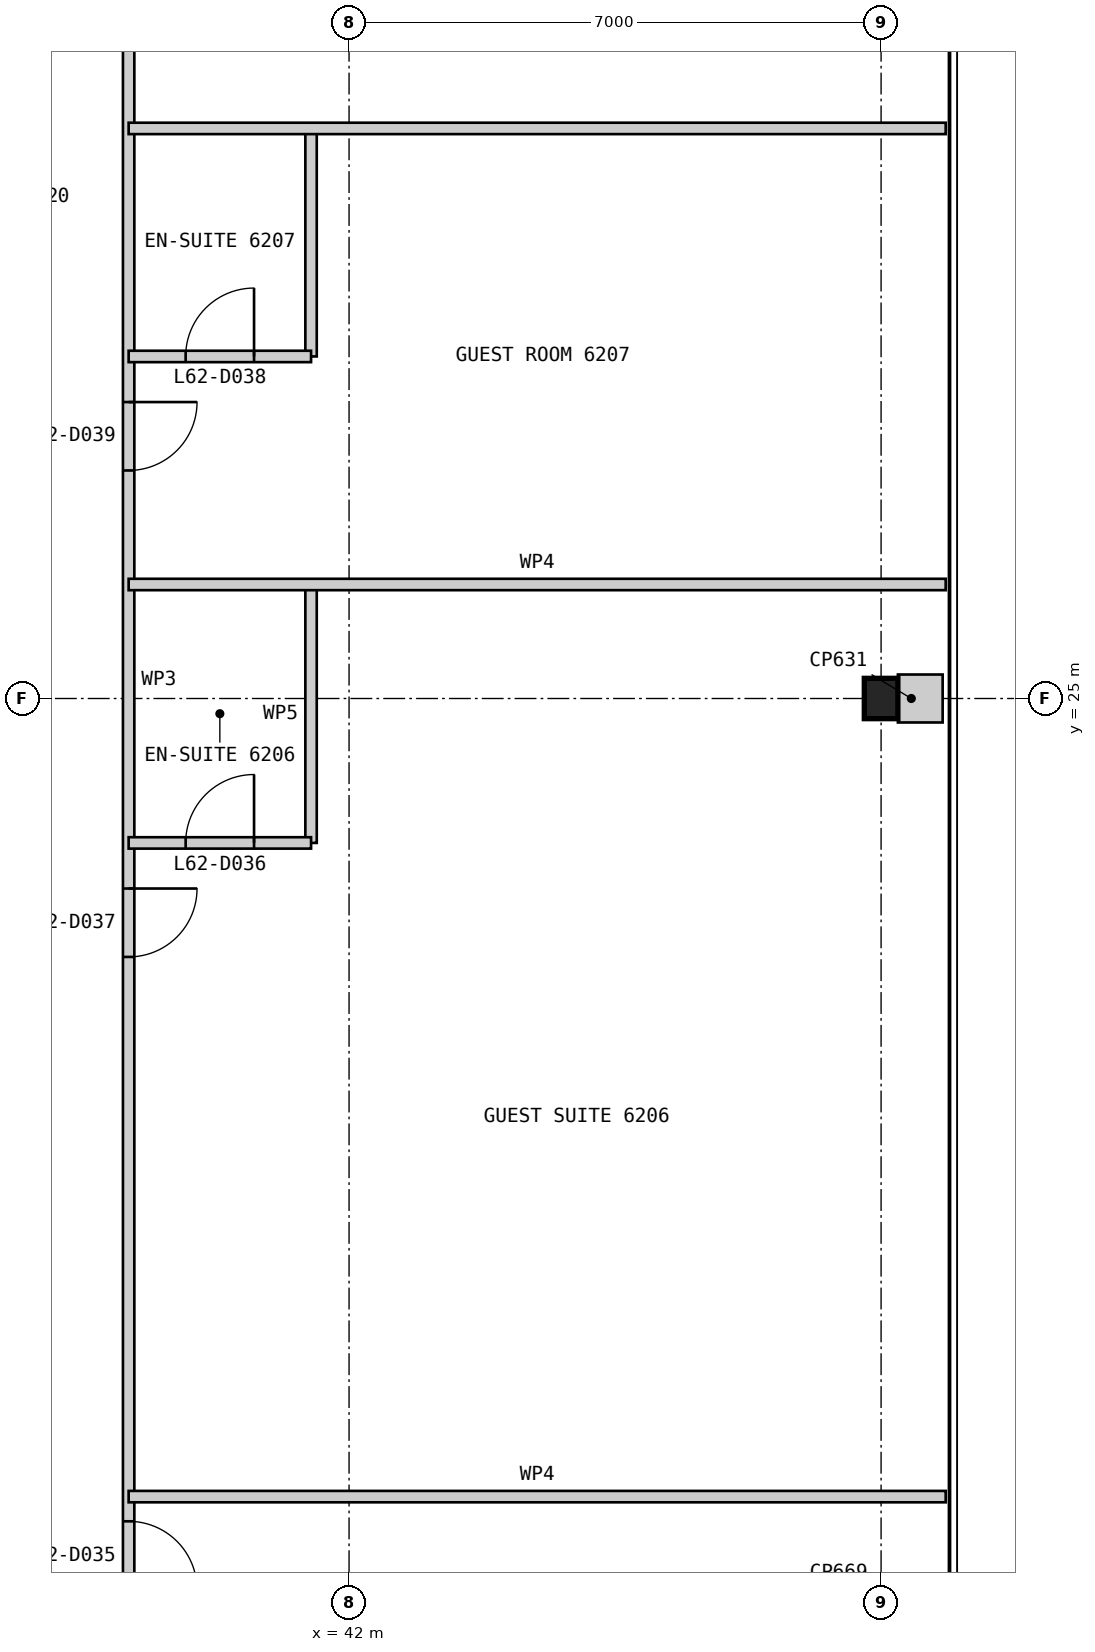
"""IFC4 building model, lengths in metres.
Left out: names, types, materials, properties, quantities, classifications, styles, units other than length and angle.
Written with IfcOpenShell. Run it as: python <this file> out.ifc"""

import sys

from ifc_helpers import new_model, si_unit, direction, frame, frame_2d, origin, origin_2d, place, context, subcontext, project, spatial, rectangle, i_section, extrude, element, fill, save


model = new_model("IFC4")
c1 = context("Model", 3, precision=1e-05, world=origin(), true_north=direction((0.0, 1.0)))
c2 = subcontext(c1, "Body", "Model", "MODEL_VIEW")
j1 = project(units=[si_unit("LENGTHUNIT", "METRE"), si_unit("PLANEANGLEUNIT", "RADIAN")], contexts=[c1])
p1 = place(None, origin())
s1 = spatial("IfcSite", under=j1, at=p1, CompositionType="ELEMENT")
p2 = place(p1, origin())
s2 = spatial("IfcBuilding", under=s1, at=p2, CompositionType="ELEMENT")
p3 = place(p2, frame((0.0, 0.0, 262.8)))
s3 = spatial("IfcBuildingStorey", under=s2, at=p3, CompositionType="ELEMENT", Elevation=262.8)
p4 = place(p3, frame((49.0, 25.0, 0.0), z_axis=(0.0, 0.0, 1.0), x_axis=(1.0, 0.0, 0.0)))
e1 = element("IfcColumn", 1, at=p4, inside=s3, PredefinedType="COLUMN", context=c2, shape_type="SweptSolid", body=[
    extrude(i_section(OverallWidth=0.442, OverallDepth=0.531, WebThickness=0.066, FlangeThickness=0.106, at=origin_2d()), origin(), (0.0, 0.0, 1.0), 3.4),
])
p5 = place(p3, frame((39.1, 10.9, 0.0), z_axis=(0.0, 0.0, 1.0), x_axis=(0.0, 1.0, 0.0)))
e2 = element("IfcWall", 2, at=p5, inside=s3, PredefinedType="PARTITIONING", context=c2, shape_type="SweptSolid", body=[
    extrude(rectangle(XDim=28.2, YDim=0.15, at=frame_2d((14.1, 0.0))), origin(), (0.0, 0.0, 1.0), 3.25),
])
p6 = place(p5, frame((2.375, 0.0, 0.0)))
e3 = element("IfcOpeningElement", 3, at=p6, cuts=e2, PredefinedType="OPENING", context=c2, shape_type="SweptSolid", body=[
    extrude(rectangle(XDim=0.9, YDim=2.1, at=frame_2d((0.45, 1.05))), frame((0.0, 0.085, 0.0), z_axis=(0.0, -1.0, 0.0), x_axis=(1.0, 0.0, 0.0)), (0.0, 0.0, 1.0), 0.17),
])
p7 = place(p5, frame((10.7, 0.0, 0.0)))
e4 = element("IfcOpeningElement", 4, at=p7, cuts=e2, PredefinedType="OPENING", context=c2, shape_type="SweptSolid", body=[
    extrude(rectangle(XDim=0.9, YDim=2.1, at=frame_2d((0.45, 1.05))), frame((0.0, 0.085, 0.0), z_axis=(0.0, -1.0, 0.0), x_axis=(1.0, 0.0, 0.0)), (0.0, 0.0, 1.0), 0.17),
])
p8 = place(p5, frame((17.1, 0.0, 0.0)))
e5 = element("IfcOpeningElement", 5, at=p8, cuts=e2, PredefinedType="OPENING", context=c2, shape_type="SweptSolid", body=[
    extrude(rectangle(XDim=0.9, YDim=2.1, at=frame_2d((0.45, 1.05))), frame((0.0, 0.085, 0.0), z_axis=(0.0, -1.0, 0.0), x_axis=(1.0, 0.0, 0.0)), (0.0, 0.0, 1.0), 0.17),
])
p9 = place(p5, frame((23.7, 0.0, 0.0)))
e6 = element("IfcOpeningElement", 6, at=p9, cuts=e2, PredefinedType="OPENING", context=c2, shape_type="SweptSolid", body=[
    extrude(rectangle(XDim=0.9, YDim=2.1, at=frame_2d((0.45, 1.05))), frame((0.0, 0.085, 0.0), z_axis=(0.0, -1.0, 0.0), x_axis=(1.0, 0.0, 0.0)), (0.0, 0.0, 1.0), 0.17),
])
p10 = place(p3, frame((49.85, 14.5, 0.0), z_axis=(0.0, 0.0, 1.0), x_axis=(-1.0, 0.0, 0.0)))
e7 = element("IfcWall", 7, at=p10, inside=s3, PredefinedType="PARTITIONING", context=c2, shape_type="SweptSolid", body=[
    extrude(rectangle(XDim=10.75, YDim=0.15, at=frame_2d((5.375, 0.0))), origin(), (0.0, 0.0, 1.0), 3.25),
])
p11 = place(p3, frame((41.5, 23.1, 0.0), z_axis=(0.0, 0.0, 1.0), x_axis=(0.0, 1.0, 0.0)))
e8 = element("IfcWall", 8, at=p11, inside=s3, PredefinedType="PARTITIONING", context=c2, shape_type="SweptSolid", body=[
    extrude(rectangle(XDim=3.4, YDim=0.15, at=frame_2d((1.7, 0.0))), origin(), (0.0, 0.0, 1.0), 3.25),
])
p12 = place(p3, frame((41.5, 23.1, 0.0), z_axis=(0.0, 0.0, 1.0), x_axis=(-1.0, 0.0, 0.0)))
e9 = element("IfcWall", 9, at=p12, inside=s3, PredefinedType="PARTITIONING", context=c2, shape_type="SweptSolid", body=[
    extrude(rectangle(XDim=2.4, YDim=0.15, at=frame_2d((1.2, 0.0))), origin(), (0.0, 0.0, 1.0), 3.25),
])
p13 = place(p12, frame((0.75, 0.0, 0.0)))
e10 = element("IfcOpeningElement", 10, at=p13, cuts=e9, PredefinedType="OPENING", context=c2, shape_type="SweptSolid", body=[
    extrude(rectangle(XDim=0.9, YDim=2.1, at=frame_2d((0.45, 1.05))), frame((0.0, 0.085, 0.0), z_axis=(0.0, -1.0, 0.0), x_axis=(1.0, 0.0, 0.0)), (0.0, 0.0, 1.0), 0.17),
])
p14 = place(p3, frame((49.85, 26.5, 0.0), z_axis=(0.0, 0.0, 1.0), x_axis=(-1.0, 0.0, 0.0)))
e11 = element("IfcWall", 11, at=p14, inside=s3, PredefinedType="PARTITIONING", context=c2, shape_type="SweptSolid", body=[
    extrude(rectangle(XDim=10.75, YDim=0.15, at=frame_2d((5.375, 0.0))), origin(), (0.0, 0.0, 1.0), 3.25),
])
p15 = place(p3, frame((41.5, 29.5, 0.0), z_axis=(0.0, 0.0, 1.0), x_axis=(0.0, 1.0, 0.0)))
e12 = element("IfcWall", 12, at=p15, inside=s3, PredefinedType="PARTITIONING", context=c2, shape_type="SweptSolid", body=[
    extrude(rectangle(XDim=3.0, YDim=0.15, at=frame_2d((1.5, 0.0))), origin(), (0.0, 0.0, 1.0), 3.25),
])
p16 = place(p3, frame((41.5, 29.5, 0.0), z_axis=(0.0, 0.0, 1.0), x_axis=(-1.0, 0.0, 0.0)))
e13 = element("IfcWall", 13, at=p16, inside=s3, PredefinedType="PARTITIONING", context=c2, shape_type="SweptSolid", body=[
    extrude(rectangle(XDim=2.4, YDim=0.15, at=frame_2d((1.2, 0.0))), origin(), (0.0, 0.0, 1.0), 3.25),
])
p17 = place(p16, frame((0.75, 0.0, 0.0)))
e14 = element("IfcOpeningElement", 14, at=p17, cuts=e13, PredefinedType="OPENING", context=c2, shape_type="SweptSolid", body=[
    extrude(rectangle(XDim=0.9, YDim=2.1, at=frame_2d((0.45, 1.05))), frame((0.0, 0.085, 0.0), z_axis=(0.0, -1.0, 0.0), x_axis=(1.0, 0.0, 0.0)), (0.0, 0.0, 1.0), 0.17),
])
p18 = place(p3, frame((49.85, 32.5, 0.0), z_axis=(0.0, 0.0, 1.0), x_axis=(-1.0, 0.0, 0.0)))
e15 = element("IfcWall", 15, at=p18, inside=s3, PredefinedType="PARTITIONING", context=c2, shape_type="SweptSolid", body=[
    extrude(rectangle(XDim=10.75, YDim=0.15, at=frame_2d((5.375, 0.0))), origin(), (0.0, 0.0, 1.0), 3.25),
])
p19 = place(p3, frame((49.81, 25.0, 0.0), z_axis=(0.0, 0.0, 1.0), x_axis=(-1.0, 0.0, 0.0)))
e16 = element("IfcWall", 16, at=p19, inside=s3, PredefinedType="PARTITIONING", context=c2, shape_type="SweptSolid", body=[
    extrude(rectangle(XDim=0.589, YDim=0.631, at=frame_2d((0.294, 0.0))), origin(), (0.0, 0.0, 1.0), 3.25),
])
p20 = place(p6, frame((0.9, 0.0, 0.0), z_axis=(0.0, 0.0, 1.0), x_axis=(-1.0, 0.0, 0.0)))
e17 = element("IfcDoor", 17, at=p20, inside=s3, OperationType="SINGLE_SWING_RIGHT", PredefinedType="DOOR", context=c2, shape_type="SweptSolid", body=[
    extrude(rectangle(XDim=0.9, YDim=2.1, at=frame_2d((0.45, 1.05))), frame((0.0, 0.025, 0.0), z_axis=(0.0, -1.0, 0.0), x_axis=(1.0, 0.0, 0.0)), (0.0, 0.0, 1.0), 0.05),
])
fill(e3, e17)
p21 = place(p13, frame((0.9, 0.0, 0.0), z_axis=(0.0, 0.0, 1.0), x_axis=(-1.0, 0.0, 0.0)))
e18 = element("IfcDoor", 18, at=p21, inside=s3, OperationType="SINGLE_SWING_RIGHT", PredefinedType="DOOR", context=c2, shape_type="SweptSolid", body=[
    extrude(rectangle(XDim=0.9, YDim=2.1, at=frame_2d((0.45, 1.05))), frame((0.0, 0.025, 0.0), z_axis=(0.0, -1.0, 0.0), x_axis=(1.0, 0.0, 0.0)), (0.0, 0.0, 1.0), 0.05),
])
fill(e10, e18)
p22 = place(p7, frame((0.9, 0.0, 0.0), z_axis=(0.0, 0.0, 1.0), x_axis=(-1.0, 0.0, 0.0)))
e19 = element("IfcDoor", 19, at=p22, inside=s3, OperationType="SINGLE_SWING_LEFT", PredefinedType="DOOR", context=c2, shape_type="SweptSolid", body=[
    extrude(rectangle(XDim=0.9, YDim=2.1, at=frame_2d((0.45, 1.05))), frame((0.0, 0.025, 0.0), z_axis=(0.0, -1.0, 0.0), x_axis=(1.0, 0.0, 0.0)), (0.0, 0.0, 1.0), 0.05),
])
fill(e4, e19)
p23 = place(p17, frame((0.9, 0.0, 0.0), z_axis=(0.0, 0.0, 1.0), x_axis=(-1.0, 0.0, 0.0)))
e20 = element("IfcDoor", 20, at=p23, inside=s3, OperationType="SINGLE_SWING_RIGHT", PredefinedType="DOOR", context=c2, shape_type="SweptSolid", body=[
    extrude(rectangle(XDim=0.9, YDim=2.1, at=frame_2d((0.45, 1.05))), frame((0.0, 0.025, 0.0), z_axis=(0.0, -1.0, 0.0), x_axis=(1.0, 0.0, 0.0)), (0.0, 0.0, 1.0), 0.05),
])
fill(e14, e20)
p24 = place(p8, frame((0.9, 0.0, 0.0), z_axis=(0.0, 0.0, 1.0), x_axis=(-1.0, 0.0, 0.0)))
e21 = element("IfcDoor", 21, at=p24, inside=s3, OperationType="SINGLE_SWING_LEFT", PredefinedType="DOOR", context=c2, shape_type="SweptSolid", body=[
    extrude(rectangle(XDim=0.9, YDim=2.1, at=frame_2d((0.45, 1.05))), frame((0.0, 0.025, 0.0), z_axis=(0.0, -1.0, 0.0), x_axis=(1.0, 0.0, 0.0)), (0.0, 0.0, 1.0), 0.05),
])
fill(e5, e21)
save(model, sys.argv[1])
